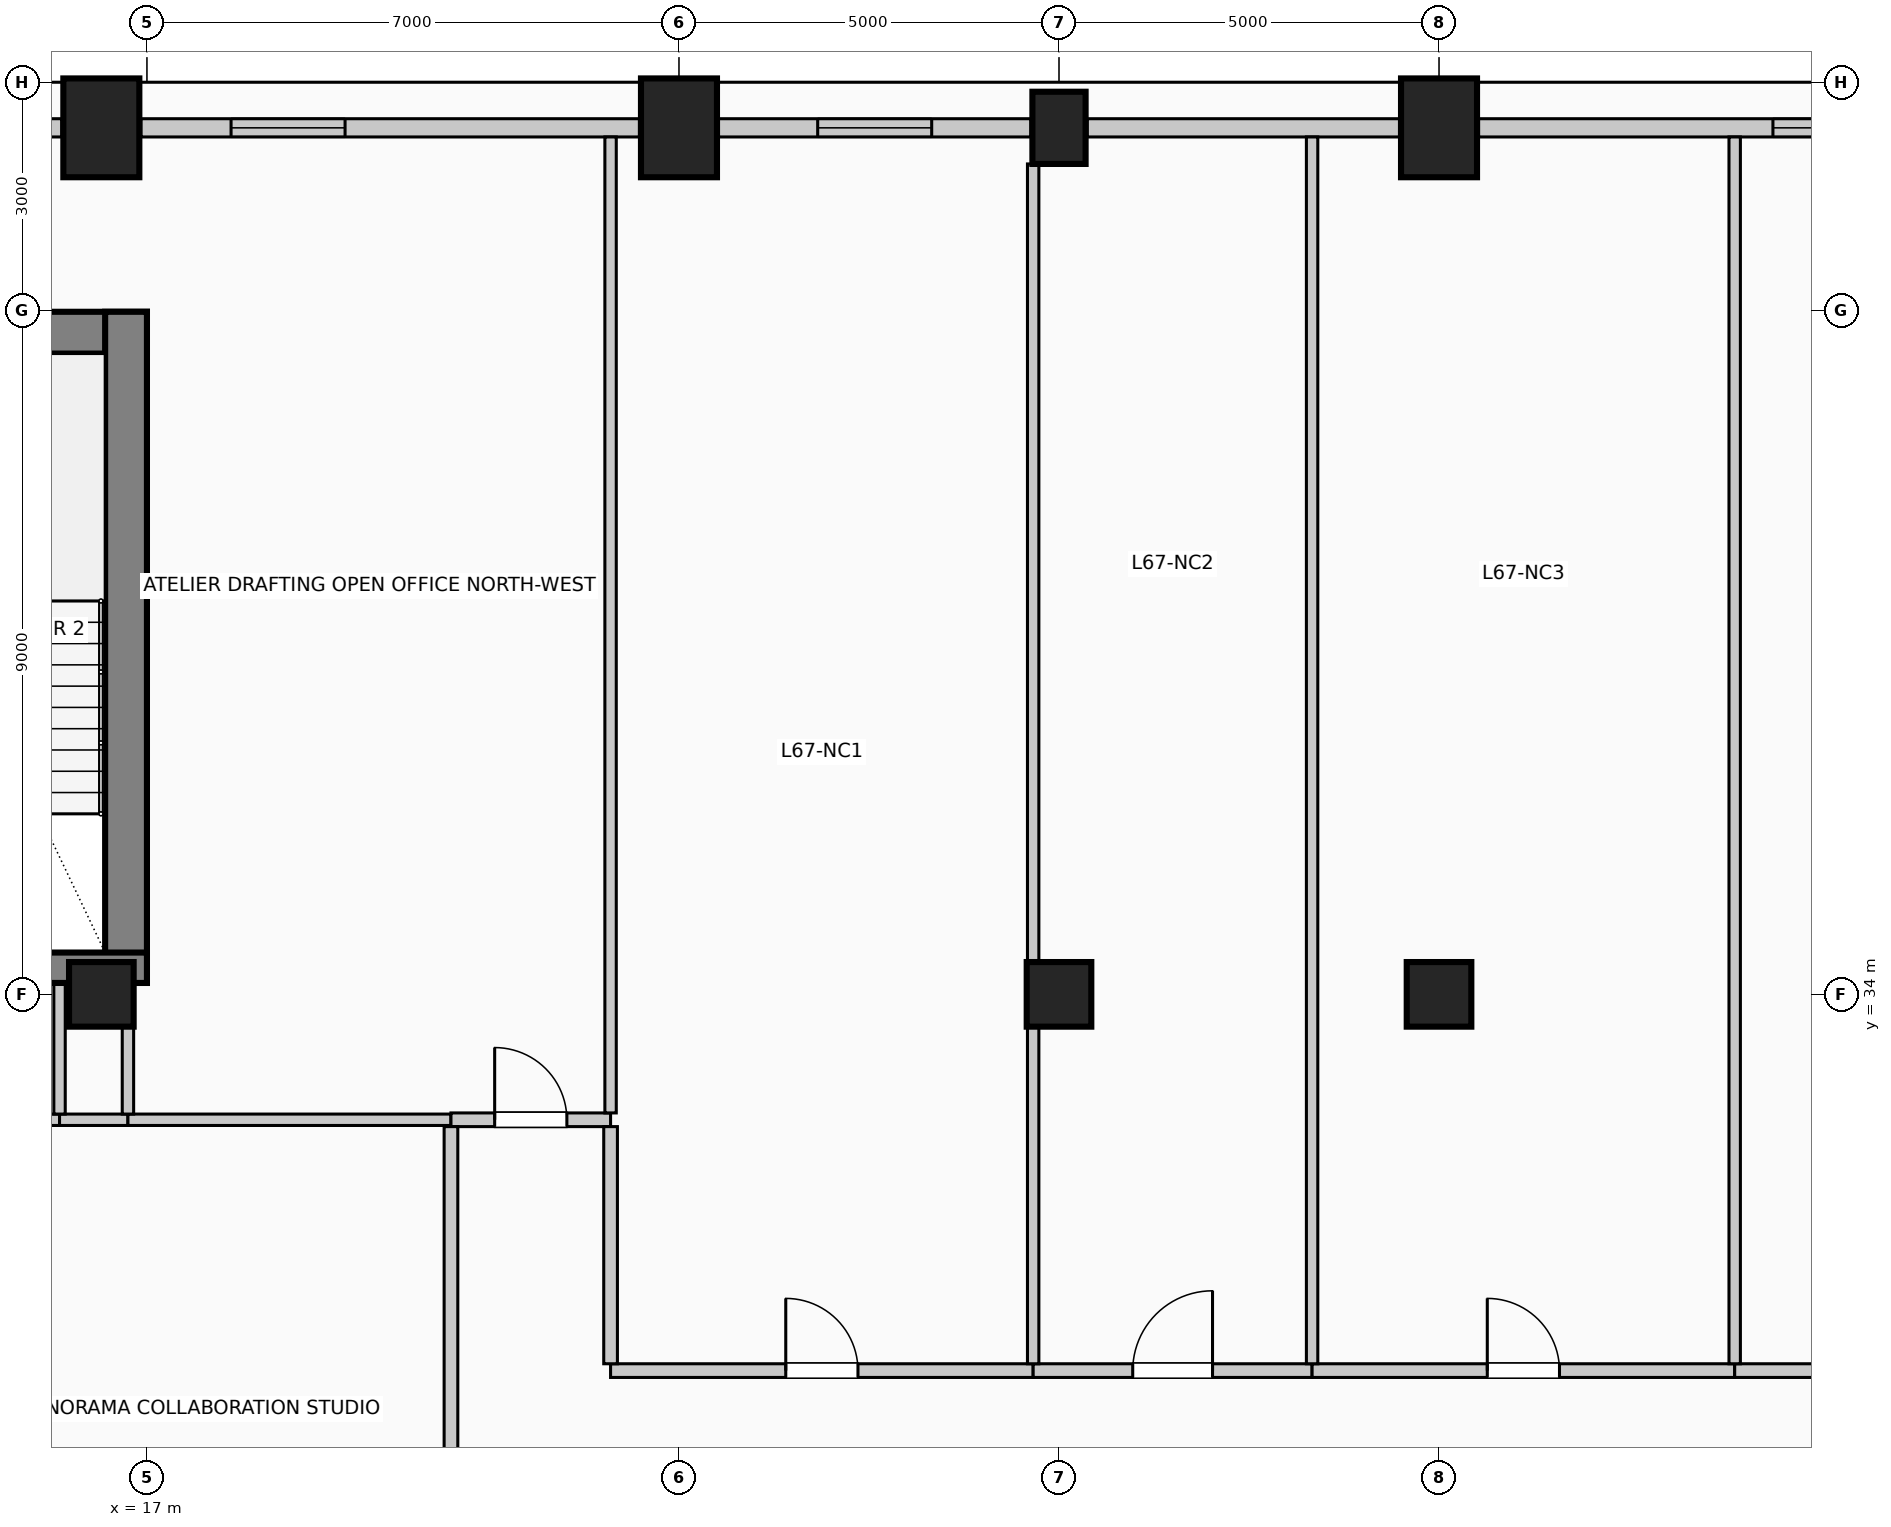
"""IFC4 building model, lengths in metres.
Left out: names, types, materials, properties, quantities, classifications, styles, units other than length and angle.
Written with IfcOpenShell. Run it as: python <this file> out.ifc"""

import sys

from ifc_helpers import new_model, si_unit, direction, frame, frame_2d, origin, origin_2d, place, context, subcontext, project, spatial, rectangle, circle, extrude, element, fill, save


model = new_model("IFC4")
c1 = context("Model", 3, precision=1e-05, world=origin(), true_north=direction((0.0, 1.0)))
c2 = subcontext(c1, "Body", "Model", "MODEL_VIEW")
j1 = project(units=[si_unit("LENGTHUNIT", "METRE"), si_unit("PLANEANGLEUNIT", "RADIAN")], contexts=[c1])
p1 = place(None, origin())
s1 = spatial("IfcSite", under=j1, at=p1, CompositionType="ELEMENT")
p2 = place(p1, origin())
s2 = spatial("IfcBuilding", under=s1, at=p2, CompositionType="ELEMENT")
p3 = place(p2, frame((0.0, 0.0, 276.6)))
s3 = spatial("IfcBuildingStorey", under=s2, at=p3, CompositionType="ELEMENT", Elevation=276.6)
p4 = place(p3, frame((3.0, 42.705, 0.0), z_axis=(0.0, 0.0, 1.0), x_axis=(1.0, 0.0, 0.0)))
e1 = element("IfcWall", 1, at=p4, inside=s3, PredefinedType="SHEAR", context=c2, shape_type="SweptSolid", body=[
    extrude(rectangle(XDim=14.0, YDim=0.55, at=frame_2d((7.0, 0.0))), origin(), (0.0, 0.0, 1.0), 4.0),
])
p5 = place(p3, frame((16.725, 34.15, 0.0), z_axis=(0.0, 0.0, 1.0), x_axis=(0.0, 1.0, 0.0)))
e2 = element("IfcWall", 2, at=p5, inside=s3, PredefinedType="SHEAR", context=c2, shape_type="SweptSolid", body=[
    extrude(rectangle(XDim=8.83, YDim=0.55, at=frame_2d((4.415, 0.0))), origin(), (0.0, 0.0, 1.0), 4.0),
])
p6 = place(p3, frame((12.29, 34.35, 0.0), z_axis=(0.0, 0.0, 1.0), x_axis=(1.0, 0.0, 0.0)))
e3 = element("IfcWall", 3, at=p6, inside=s3, PredefinedType="SHEAR", context=c2, shape_type="SweptSolid", body=[
    extrude(rectangle(XDim=4.71, YDim=0.4, at=frame_2d((2.355, 0.0))), origin(), (0.0, 0.0, 1.0), 4.0),
])
p7 = place(p6, frame((1.4, 0.0, 0.0)))
e4 = element("IfcOpeningElement", 4, at=p7, cuts=e3, PredefinedType="OPENING", context=c2, shape_type="SweptSolid", body=[
    extrude(rectangle(XDim=1.15, YDim=2.2, at=frame_2d((0.575, 1.1))), frame((0.0, 0.21, 0.0), z_axis=(0.0, -1.0, 0.0), x_axis=(1.0, 0.0, 0.0)), (0.0, 0.0, 1.0), 0.42),
])
for number, where, z_axis, x_axis in (
    (5, (16.4, 45.4, 0.0), (0.0, 0.0, 1.0), (1.0, 0.0, 0.0)),
    (6, (24.0, 45.4, 0.0), (0.0, 0.0, 1.0), (1.0, 0.0, 0.0)),
):
    element("IfcColumn", number, at=place(p3, frame(where, z_axis=z_axis, x_axis=x_axis)), inside=s3, PredefinedType="COLUMN", context=c2, shape_type="SweptSolid", body=[
        extrude(rectangle(XDim=1.0, YDim=1.3, at=origin_2d()), origin(), (0.0, 0.0, 1.0), 4.0),
    ])
p8 = place(p3, frame((29.0, 45.4, 0.0), z_axis=(0.0, 0.0, 1.0), x_axis=(1.0, 0.0, 0.0)))
e7 = element("IfcColumn", 7, at=p8, inside=s3, PredefinedType="COLUMN", context=c2, shape_type="SweptSolid", body=[
    extrude(rectangle(XDim=0.7, YDim=0.95, at=origin_2d()), origin(), (0.0, 0.0, 1.0), 4.0),
])
p9 = place(p3, frame((34.0, 45.4, 0.0), z_axis=(0.0, 0.0, 1.0), x_axis=(1.0, 0.0, 0.0)))
e8 = element("IfcColumn", 8, at=p9, inside=s3, PredefinedType="COLUMN", context=c2, shape_type="SweptSolid", body=[
    extrude(rectangle(XDim=1.0, YDim=1.3, at=origin_2d()), origin(), (0.0, 0.0, 1.0), 4.0),
])
for number, where, z_axis, x_axis in (
    (9, (16.4, 34.0, 0.0), (0.0, 0.0, 1.0), (1.0, 0.0, 0.0)),
    (10, (29.0, 34.0, 0.0), (0.0, 0.0, 1.0), (1.0, 0.0, 0.0)),
    (11, (34.0, 34.0, 0.0), (0.0, 0.0, 1.0), (1.0, 0.0, 0.0)),
):
    element("IfcColumn", number, at=place(p3, frame(where, z_axis=z_axis, x_axis=x_axis)), inside=s3, PredefinedType="COLUMN", context=c2, shape_type="SweptSolid", body=[
        extrude(circle(Radius=0.425, at=origin_2d()), origin(), (0.0, 0.0, 1.0), 4.0),
    ])
p10 = place(p3, frame((14.37, 45.4, 0.0), z_axis=(0.0, 0.0, 1.0), x_axis=(1.0, 0.0, 0.0)))
e12 = element("IfcWall", 12, at=p10, inside=s3, PredefinedType="SOLIDWALL", context=c2, shape_type="SweptSolid", body=[
    extrude(rectangle(XDim=1.51, YDim=0.24, at=frame_2d((0.755, 0.0))), origin(), (0.0, 0.0, 1.0), 2.91),
])
p11 = place(p3, frame((16.92, 45.4, 0.0), z_axis=(0.0, 0.0, 1.0), x_axis=(1.0, 0.0, 0.0)))
e13 = element("IfcWall", 13, at=p11, inside=s3, PredefinedType="SOLIDWALL", context=c2, shape_type="SweptSolid", body=[
    extrude(rectangle(XDim=6.56, YDim=0.24, at=frame_2d((3.28, 0.0))), origin(), (0.0, 0.0, 1.0), 2.91),
])
p12 = place(p11, frame((1.187, 0.0, 0.42)))
e14 = element("IfcOpeningElement", 14, at=p12, cuts=e13, PredefinedType="OPENING", context=c2, shape_type="SweptSolid", body=[
    extrude(rectangle(XDim=1.5, YDim=2.2, at=frame_2d((0.75, 1.1))), frame((0.0, 0.13, 0.0), z_axis=(0.0, -1.0, 0.0), x_axis=(1.0, 0.0, 0.0)), (0.0, 0.0, 1.0), 0.26),
])
p13 = place(p3, frame((24.52, 45.4, 0.0), z_axis=(0.0, 0.0, 1.0), x_axis=(1.0, 0.0, 0.0)))
e15 = element("IfcWall", 15, at=p13, inside=s3, PredefinedType="SOLIDWALL", context=c2, shape_type="SweptSolid", body=[
    extrude(rectangle(XDim=4.11, YDim=0.24, at=frame_2d((2.055, 0.0))), origin(), (0.0, 0.0, 1.0), 2.91),
])
p14 = place(p13, frame((1.305, 0.0, 0.42)))
e16 = element("IfcOpeningElement", 16, at=p14, cuts=e15, PredefinedType="OPENING", context=c2, shape_type="SweptSolid", body=[
    extrude(rectangle(XDim=1.5, YDim=2.2, at=frame_2d((0.75, 1.1))), frame((0.0, 0.13, 0.0), z_axis=(0.0, -1.0, 0.0), x_axis=(1.0, 0.0, 0.0)), (0.0, 0.0, 1.0), 0.26),
])
p15 = place(p3, frame((29.37, 45.4, 0.0), z_axis=(0.0, 0.0, 1.0), x_axis=(1.0, 0.0, 0.0)))
e17 = element("IfcWall", 17, at=p15, inside=s3, PredefinedType="SOLIDWALL", context=c2, shape_type="SweptSolid", body=[
    extrude(rectangle(XDim=4.11, YDim=0.24, at=frame_2d((2.055, 0.0))), origin(), (0.0, 0.0, 1.0), 2.91),
])
p16 = place(p3, frame((34.52, 45.4, 0.0), z_axis=(0.0, 0.0, 1.0), x_axis=(1.0, 0.0, 0.0)))
e18 = element("IfcWall", 18, at=p16, inside=s3, PredefinedType="SOLIDWALL", context=c2, shape_type="SweptSolid", body=[
    extrude(rectangle(XDim=6.56, YDim=0.24, at=frame_2d((3.28, 0.0))), origin(), (0.0, 0.0, 1.0), 2.91),
])
p17 = place(p16, frame((3.873, 0.0, 0.42)))
e19 = element("IfcOpeningElement", 19, at=p17, cuts=e18, PredefinedType="OPENING", context=c2, shape_type="SweptSolid", body=[
    extrude(rectangle(XDim=1.5, YDim=2.2, at=frame_2d((0.75, 1.1))), frame((0.0, 0.13, 0.0), z_axis=(0.0, -1.0, 0.0), x_axis=(1.0, 0.0, 0.0)), (0.0, 0.0, 1.0), 0.26),
])
p18 = place(p3, frame((23.1, 29.05, 0.0), z_axis=(0.0, 0.0, 1.0), x_axis=(1.0, 0.0, 0.0)))
e20 = element("IfcWall", 20, at=p18, inside=s3, PredefinedType="PARTITIONING", context=c2, shape_type="SweptSolid", body=[
    extrude(rectangle(XDim=5.56, YDim=0.18, at=frame_2d((2.78, 0.0))), origin(), (0.0, 0.0, 1.0), 3.66),
])
p19 = place(p18, frame((2.305, 0.0, 0.0)))
e21 = element("IfcOpeningElement", 21, at=p19, cuts=e20, PredefinedType="OPENING", context=c2, shape_type="SweptSolid", body=[
    extrude(rectangle(XDim=0.95, YDim=2.15, at=frame_2d((0.475, 1.075))), frame((0.0, 0.1, 0.0), z_axis=(0.0, -1.0, 0.0), x_axis=(1.0, 0.0, 0.0)), (0.0, 0.0, 1.0), 0.2),
])
p20 = place(p3, frame((28.66, 29.05, 0.0), z_axis=(0.0, 0.0, 1.0), x_axis=(1.0, 0.0, 0.0)))
e22 = element("IfcWall", 22, at=p20, inside=s3, PredefinedType="PARTITIONING", context=c2, shape_type="SweptSolid", body=[
    extrude(rectangle(XDim=3.67, YDim=0.18, at=frame_2d((1.835, 0.0))), origin(), (0.0, 0.0, 1.0), 3.66),
])
p21 = place(p20, frame((1.31, 0.0, 0.0)))
e23 = element("IfcOpeningElement", 23, at=p21, cuts=e22, PredefinedType="OPENING", context=c2, shape_type="SweptSolid", body=[
    extrude(rectangle(XDim=1.05, YDim=2.15, at=frame_2d((0.525, 1.075))), frame((0.0, 0.1, 0.0), z_axis=(0.0, -1.0, 0.0), x_axis=(1.0, 0.0, 0.0)), (0.0, 0.0, 1.0), 0.2),
])
p22 = place(p3, frame((32.33, 29.05, 0.0), z_axis=(0.0, 0.0, 1.0), x_axis=(1.0, 0.0, 0.0)))
e24 = element("IfcWall", 24, at=p22, inside=s3, PredefinedType="PARTITIONING", context=c2, shape_type="SweptSolid", body=[
    extrude(rectangle(XDim=5.56, YDim=0.18, at=frame_2d((2.78, 0.0))), origin(), (0.0, 0.0, 1.0), 3.66),
])
p23 = place(p22, frame((2.305, 0.0, 0.0)))
e25 = element("IfcOpeningElement", 25, at=p23, cuts=e24, PredefinedType="OPENING", context=c2, shape_type="SweptSolid", body=[
    extrude(rectangle(XDim=0.95, YDim=2.15, at=frame_2d((0.475, 1.075))), frame((0.0, 0.1, 0.0), z_axis=(0.0, -1.0, 0.0), x_axis=(1.0, 0.0, 0.0)), (0.0, 0.0, 1.0), 0.2),
])
p24 = place(p3, frame((37.89, 29.05, 0.0), z_axis=(0.0, 0.0, 1.0), x_axis=(1.0, 0.0, 0.0)))
e26 = element("IfcWall", 26, at=p24, inside=s3, PredefinedType="PARTITIONING", context=c2, shape_type="SweptSolid", body=[
    extrude(rectangle(XDim=3.66, YDim=0.18, at=frame_2d((1.83, 0.0))), origin(), (0.0, 0.0, 1.0), 3.66),
])
p25 = place(p24, frame((1.305, 0.0, 0.0)))
e27 = element("IfcOpeningElement", 27, at=p25, cuts=e26, PredefinedType="OPENING", context=c2, shape_type="SweptSolid", body=[
    extrude(rectangle(XDim=1.05, YDim=2.15, at=frame_2d((0.525, 1.075))), frame((0.0, 0.1, 0.0), z_axis=(0.0, -1.0, 0.0), x_axis=(1.0, 0.0, 0.0)), (0.0, 0.0, 1.0), 0.2),
])
p26 = place(p3, frame((12.33, 32.35, 0.0), z_axis=(0.0, 0.0, 1.0), x_axis=(1.0, 0.0, 0.0)))
e28 = element("IfcWall", 28, at=p26, inside=s3, PredefinedType="PARTITIONING", context=c2, shape_type="SweptSolid", body=[
    extrude(rectangle(XDim=3.52, YDim=0.15, at=frame_2d((1.76, 0.0))), origin(), (0.0, 0.0, 1.0), 3.66),
])
p27 = place(p26, frame((1.235, 0.0, 0.0)))
e29 = element("IfcOpeningElement", 29, at=p27, cuts=e28, PredefinedType="OPENING", context=c2, shape_type="SweptSolid", body=[
    extrude(rectangle(XDim=1.05, YDim=2.15, at=frame_2d((0.525, 1.075))), frame((0.0, 0.085, 0.0), z_axis=(0.0, -1.0, 0.0), x_axis=(1.0, 0.0, 0.0)), (0.0, 0.0, 1.0), 0.17),
])
p28 = place(p3, frame((15.85, 32.35, 0.0), z_axis=(0.0, 0.0, 1.0), x_axis=(1.0, 0.0, 0.0)))
e30 = element("IfcWall", 30, at=p28, inside=s3, PredefinedType="PARTITIONING", context=c2, shape_type="SweptSolid", body=[
    extrude(rectangle(XDim=0.9, YDim=0.15, at=frame_2d((0.45, 0.0))), origin(), (0.0, 0.0, 1.0), 3.66),
])
p29 = place(p3, frame((16.75, 32.35, 0.0), z_axis=(0.0, 0.0, 1.0), x_axis=(1.0, 0.0, 0.0)))
e31 = element("IfcWall", 31, at=p29, inside=s3, PredefinedType="PARTITIONING", context=c2, shape_type="SweptSolid", body=[
    extrude(rectangle(XDim=4.25, YDim=0.15, at=frame_2d((2.125, 0.0))), origin(), (0.0, 0.0, 1.0), 3.66),
])
p30 = place(p3, frame((21.0, 32.35, 0.0), z_axis=(0.0, 0.0, 1.0), x_axis=(1.0, 0.0, 0.0)))
e32 = element("IfcWall", 32, at=p30, inside=s3, PredefinedType="PARTITIONING", context=c2, shape_type="SweptSolid", body=[
    extrude(rectangle(XDim=2.1, YDim=0.18, at=frame_2d((1.05, 0.0))), origin(), (0.0, 0.0, 1.0), 3.66),
])
p31 = place(p30, frame((0.575, 0.0, 0.0)))
e33 = element("IfcOpeningElement", 33, at=p31, cuts=e32, PredefinedType="OPENING", context=c2, shape_type="SweptSolid", body=[
    extrude(rectangle(XDim=0.95, YDim=2.15, at=frame_2d((0.475, 1.075))), frame((0.0, 0.1, 0.0), z_axis=(0.0, -1.0, 0.0), x_axis=(1.0, 0.0, 0.0)), (0.0, 0.0, 1.0), 0.2),
])
p32 = place(p3, frame((15.85, 32.425, 0.0), z_axis=(0.0, 0.0, 1.0), x_axis=(0.0, 1.0, 0.0)))
e34 = element("IfcWall", 34, at=p32, inside=s3, PredefinedType="PARTITIONING", context=c2, shape_type="SweptSolid", body=[
    extrude(rectangle(XDim=1.725, YDim=0.15, at=frame_2d((0.862, 0.0))), origin(), (0.0, 0.0, 1.0), 3.66),
])
p33 = place(p3, frame((16.75, 32.425, 0.0), z_axis=(0.0, 0.0, 1.0), x_axis=(0.0, 1.0, 0.0)))
e35 = element("IfcWall", 35, at=p33, inside=s3, PredefinedType="PARTITIONING", context=c2, shape_type="SweptSolid", body=[
    extrude(rectangle(XDim=1.15, YDim=0.15, at=frame_2d((0.575, 0.0))), origin(), (0.0, 0.0, 1.0), 3.66),
])
p34 = place(p3, frame((21.0, 24.875, 0.0), z_axis=(0.0, 0.0, 1.0), x_axis=(0.0, 1.0, 0.0)))
e36 = element("IfcWall", 36, at=p34, inside=s3, PredefinedType="PARTITIONING", context=c2, shape_type="SweptSolid", body=[
    extrude(rectangle(XDim=7.385, YDim=0.18, at=frame_2d((3.692, 0.0))), origin(), (0.0, 0.0, 1.0), 3.66),
])
p35 = place(p3, frame((23.1, 29.14, 0.0), z_axis=(0.0, 0.0, 1.0), x_axis=(0.0, 1.0, 0.0)))
e37 = element("IfcWall", 37, at=p35, inside=s3, PredefinedType="PARTITIONING", context=c2, shape_type="SweptSolid", body=[
    extrude(rectangle(XDim=3.12, YDim=0.18, at=frame_2d((1.56, 0.0))), origin(), (0.0, 0.0, 1.0), 3.66),
])
p36 = place(p3, frame((23.1, 32.44, 0.0), z_axis=(0.0, 0.0, 1.0), x_axis=(0.0, 1.0, 0.0)))
e38 = element("IfcWall", 38, at=p36, inside=s3, PredefinedType="PARTITIONING", context=c2, shape_type="SweptSolid", body=[
    extrude(rectangle(XDim=12.84, YDim=0.15, at=frame_2d((6.42, 0.0))), origin(), (0.0, 0.0, 1.0), 3.66),
])
p37 = place(p3, frame((28.66, 29.14, 0.0), z_axis=(0.0, 0.0, 1.0), x_axis=(0.0, 1.0, 0.0)))
e39 = element("IfcWall", 39, at=p37, inside=s3, PredefinedType="PARTITIONING", context=c2, shape_type="SweptSolid", body=[
    extrude(rectangle(XDim=4.435, YDim=0.15, at=frame_2d((2.218, 0.0))), origin(), (0.0, 0.0, 1.0), 3.66),
])
p38 = place(p3, frame((28.66, 34.425, 0.0), z_axis=(0.0, 0.0, 1.0), x_axis=(0.0, 1.0, 0.0)))
e40 = element("IfcWall", 40, at=p38, inside=s3, PredefinedType="PARTITIONING", context=c2, shape_type="SweptSolid", body=[
    extrude(rectangle(XDim=10.5, YDim=0.15, at=frame_2d((5.25, 0.0))), origin(), (0.0, 0.0, 1.0), 3.66),
])
for number, where, z_axis, x_axis in (
    (41, (32.33, 29.14, 0.0), (0.0, 0.0, 1.0), (0.0, 1.0, 0.0)),
    (42, (37.89, 29.14, 0.0), (0.0, 0.0, 1.0), (0.0, 1.0, 0.0)),
):
    element("IfcWall", number, at=place(p3, frame(where, z_axis=z_axis, x_axis=x_axis)), inside=s3, PredefinedType="PARTITIONING", context=c2, shape_type="SweptSolid", body=[
        extrude(rectangle(XDim=16.14, YDim=0.15, at=frame_2d((8.07, 0.0))), origin(), (0.0, 0.0, 1.0), 3.66),
    ])
p39 = place(p12, origin())
e43 = element("IfcWindow", 43, at=p39, inside=s3, PartitioningType="SINGLE_PANEL", PredefinedType="WINDOW", context=c2, shape_type="SweptSolid", body=[
    extrude(rectangle(XDim=1.5, YDim=2.2, at=frame_2d((0.75, 1.1))), frame((0.0, 0.03, 0.0), z_axis=(0.0, -1.0, 0.0), x_axis=(1.0, 0.0, 0.0)), (0.0, 0.0, 1.0), 0.06),
])
fill(e14, e43)
p40 = place(p14, origin())
e44 = element("IfcWindow", 44, at=p40, inside=s3, PartitioningType="SINGLE_PANEL", PredefinedType="WINDOW", context=c2, shape_type="SweptSolid", body=[
    extrude(rectangle(XDim=1.5, YDim=2.2, at=frame_2d((0.75, 1.1))), frame((0.0, 0.03, 0.0), z_axis=(0.0, -1.0, 0.0), x_axis=(1.0, 0.0, 0.0)), (0.0, 0.0, 1.0), 0.06),
])
fill(e16, e44)
p41 = place(p17, origin())
e45 = element("IfcWindow", 45, at=p41, inside=s3, PartitioningType="SINGLE_PANEL", PredefinedType="WINDOW", context=c2, shape_type="SweptSolid", body=[
    extrude(rectangle(XDim=1.5, YDim=2.2, at=frame_2d((0.75, 1.1))), frame((0.0, 0.03, 0.0), z_axis=(0.0, -1.0, 0.0), x_axis=(1.0, 0.0, 0.0)), (0.0, 0.0, 1.0), 0.06),
])
fill(e19, e45)
p42 = place(p19, origin())
e46 = element("IfcDoor", 46, at=p42, inside=s3, OperationType="SINGLE_SWING_LEFT", PredefinedType="DOOR", context=c2, shape_type="SweptSolid", body=[
    extrude(rectangle(XDim=0.95, YDim=2.15, at=frame_2d((0.475, 1.075))), frame((0.0, 0.025, 0.0), z_axis=(0.0, -1.0, 0.0), x_axis=(1.0, 0.0, 0.0)), (0.0, 0.0, 1.0), 0.05),
])
fill(e21, e46)
p43 = place(p21, origin())
e47 = element("IfcDoor", 47, at=p43, inside=s3, OperationType="SINGLE_SWING_RIGHT", PredefinedType="DOOR", context=c2, shape_type="SweptSolid", body=[
    extrude(rectangle(XDim=1.05, YDim=2.15, at=frame_2d((0.525, 1.075))), frame((0.0, 0.025, 0.0), z_axis=(0.0, -1.0, 0.0), x_axis=(1.0, 0.0, 0.0)), (0.0, 0.0, 1.0), 0.05),
])
fill(e23, e47)
p44 = place(p23, origin())
e48 = element("IfcDoor", 48, at=p44, inside=s3, OperationType="SINGLE_SWING_LEFT", PredefinedType="DOOR", context=c2, shape_type="SweptSolid", body=[
    extrude(rectangle(XDim=0.95, YDim=2.15, at=frame_2d((0.475, 1.075))), frame((0.0, 0.025, 0.0), z_axis=(0.0, -1.0, 0.0), x_axis=(1.0, 0.0, 0.0)), (0.0, 0.0, 1.0), 0.05),
])
fill(e25, e48)
p45 = place(p31, origin())
e49 = element("IfcDoor", 49, at=p45, inside=s3, OperationType="SINGLE_SWING_LEFT", PredefinedType="DOOR", context=c2, shape_type="SweptSolid", body=[
    extrude(rectangle(XDim=0.95, YDim=2.15, at=frame_2d((0.475, 1.075))), frame((0.0, 0.025, 0.0), z_axis=(0.0, -1.0, 0.0), x_axis=(1.0, 0.0, 0.0)), (0.0, 0.0, 1.0), 0.05),
])
fill(e33, e49)
save(model, sys.argv[1])
